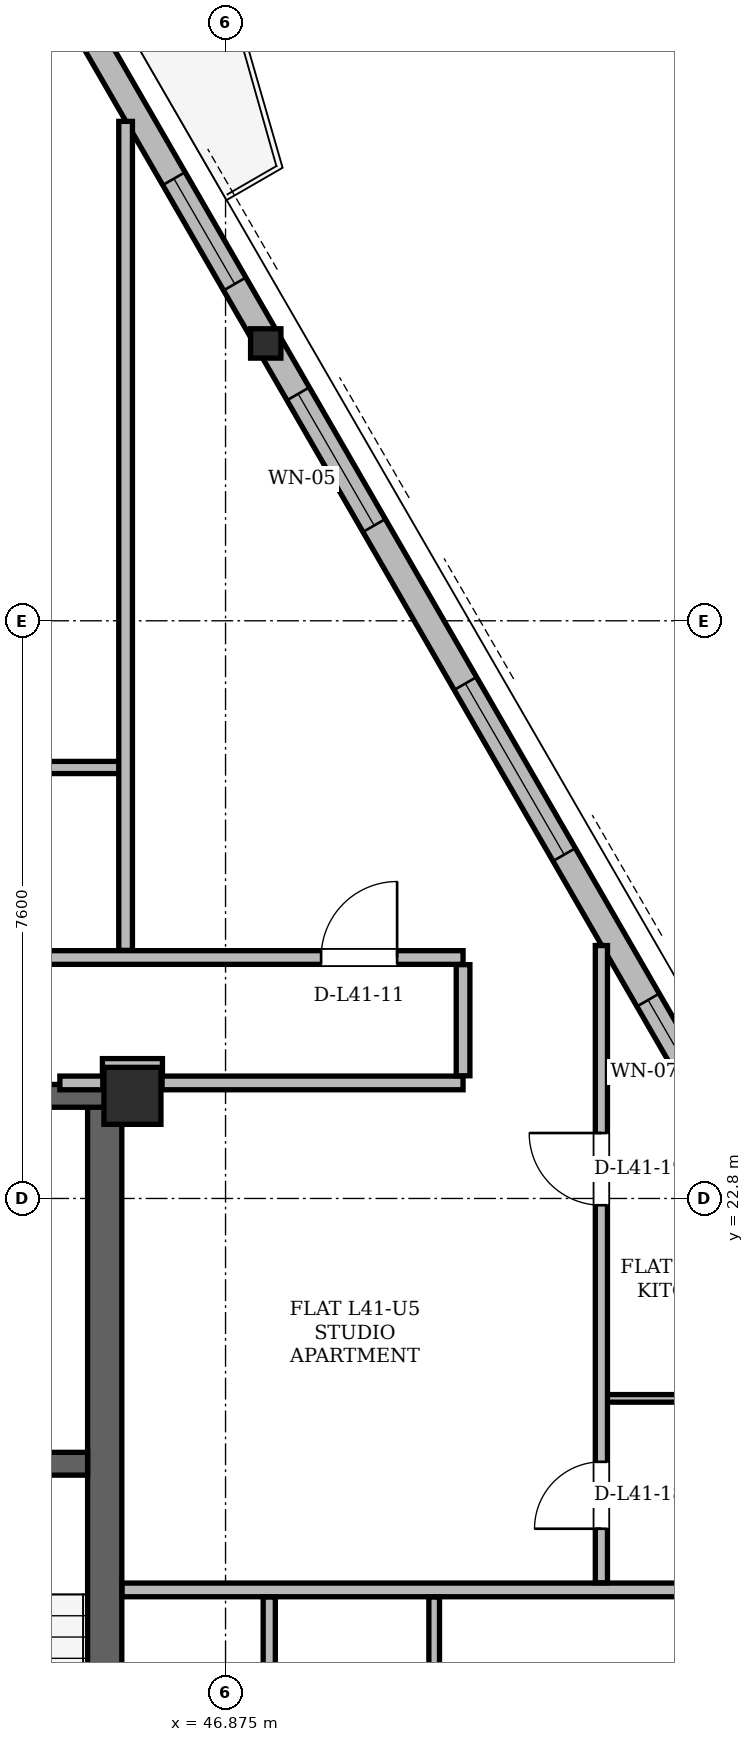
"""IFC4 building model, lengths in metres.
Left out: names, types, materials, properties, quantities, classifications, styles, units other than length and angle.
Written with IfcOpenShell. Run it as: python <this file> out.ifc"""

import sys

from ifc_helpers import new_model, si_unit, direction, frame, frame_2d, origin, origin_2d, place, context, subcontext, project, spatial, rectangle, hollow_rectangle, i_section, extrude, element, fill, save


model = new_model("IFC4")
c1 = context("Model", 3, precision=1e-05, world=origin(), true_north=direction((0.0, 1.0)))
c2 = subcontext(c1, "Body", "Model", "MODEL_VIEW")
j1 = project(units=[si_unit("LENGTHUNIT", "METRE"), si_unit("PLANEANGLEUNIT", "RADIAN")], contexts=[c1])
p1 = place(None, origin())
s1 = spatial("IfcSite", under=j1, at=p1, CompositionType="ELEMENT")
p2 = place(p1, origin())
s2 = spatial("IfcBuilding", under=s1, at=p2, CompositionType="ELEMENT")
p3 = place(p2, frame((0.0, 0.0, 156.6)))
s3 = spatial("IfcBuildingStorey", under=s2, at=p3, CompositionType="ELEMENT", Elevation=156.6)
p4 = place(p3, frame((45.65, 24.15, 0.0), z_axis=(0.0, 0.0, 1.0), x_axis=(1.0, 0.0, 0.0)))
e1 = element("IfcColumn", 1, at=p4, inside=s3, PredefinedType="COLUMN", context=c2, shape_type="SweptSolid", body=[
    extrude(hollow_rectangle(XDim=0.75, YDim=0.75, WallThickness=0.06, at=origin_2d()), origin(), (0.0, 0.0, 1.0), 3.6),
])
p5 = place(p3, frame((47.44, 34.062, 0.004), z_axis=(-0.020187050429, -0.007408715477, 0.999768770231), x_axis=(0.34453325986, -0.938774111728, 0.0)))
e2 = element("IfcColumn", 2, at=p5, inside=s3, PredefinedType="COLUMN", context=c2, shape_type="SweptSolid", body=[
    extrude(i_section(OverallWidth=0.399, OverallDepth=0.386, WebThickness=0.021, FlangeThickness=0.033, at=origin_2d()), origin(), (0.0, 0.0, 1.0), 3.592),
])
p6 = place(p3, frame((45.285, 11.0, 0.0), z_axis=(0.0, 0.0, 1.0), x_axis=(0.0, 1.0, 0.0)))
e3 = element("IfcWall", 3, at=p6, inside=s3, PredefinedType="SHEAR", context=c2, shape_type="SweptSolid", body=[
    extrude(rectangle(XDim=13.3, YDim=0.45, at=frame_2d((6.65, 0.0))), origin(), (0.0, 0.0, 1.0), 3.38),
])
p7 = place(p3, frame((29.65, 24.15, 0.0), z_axis=(0.0, 0.0, 1.0), x_axis=(1.0, 0.0, 0.0)))
e4 = element("IfcWall", 4, at=p7, inside=s3, PredefinedType="SHEAR", context=c2, shape_type="SweptSolid", body=[
    extrude(rectangle(XDim=15.7, YDim=0.3, at=frame_2d((7.85, 0.0))), origin(), (0.0, 0.0, 1.0), 3.38),
])
p8 = place(p7, frame((1.7, 0.0, 0.0)))
e5 = element("IfcOpeningElement", 5, at=p8, cuts=e4, PredefinedType="OPENING", context=c2, shape_type="SweptSolid", body=[
    extrude(rectangle(XDim=1.2, YDim=2.2, at=frame_2d((0.6, 1.1))), frame((0.0, 0.15, 0.0), z_axis=(0.0, -1.0, 0.0), x_axis=(1.0, 0.0, 0.0)), (0.0, 0.0, 1.0), 0.3),
])
p9 = place(p7, frame((12.8, 0.0, 0.0)))
e6 = element("IfcOpeningElement", 6, at=p9, cuts=e4, PredefinedType="OPENING", context=c2, shape_type="SweptSolid", body=[
    extrude(rectangle(XDim=1.2, YDim=2.2, at=frame_2d((0.6, 1.1))), frame((0.0, 0.15, 0.0), z_axis=(0.0, -1.0, 0.0), x_axis=(1.0, 0.0, 0.0)), (0.0, 0.0, 1.0), 0.3),
])
p10 = place(p7, frame((6.55, 0.0, 0.0)))
e7 = element("IfcOpeningElement", 7, at=p10, cuts=e4, PredefinedType="OPENING", context=c2, shape_type="SweptSolid", body=[
    extrude(rectangle(XDim=0.9, YDim=2.05, at=frame_2d((0.45, 1.025))), frame((0.0, 0.15, 0.0), z_axis=(0.0, -1.0, 0.0), x_axis=(1.0, 0.0, 0.0)), (0.0, 0.0, 1.0), 0.3),
])
p11 = place(p7, frame((8.45, 0.0, 0.0)))
e8 = element("IfcOpeningElement", 8, at=p11, cuts=e4, PredefinedType="OPENING", context=c2, shape_type="SweptSolid", body=[
    extrude(rectangle(XDim=0.9, YDim=2.05, at=frame_2d((0.45, 1.025))), frame((0.0, 0.15, 0.0), z_axis=(0.0, -1.0, 0.0), x_axis=(1.0, 0.0, 0.0)), (0.0, 0.0, 1.0), 0.3),
])
p12 = place(p3, frame((41.05, 19.31, 0.0), z_axis=(0.0, 0.0, 1.0), x_axis=(1.0, 0.0, 0.0)))
e9 = element("IfcWall", 9, at=p12, inside=s3, PredefinedType="SHEAR", context=c2, shape_type="SweptSolid", body=[
    extrude(rectangle(XDim=4.01, YDim=0.3, at=frame_2d((2.005, 0.0))), origin(), (0.0, 0.0, 1.0), 3.38),
])
p13 = place(p12, frame((1.6, 0.0, 0.0)))
e10 = element("IfcOpeningElement", 10, at=p13, cuts=e9, PredefinedType="OPENING", context=c2, shape_type="SweptSolid", body=[
    extrude(rectangle(XDim=1.4, YDim=2.2, at=frame_2d((0.7, 1.1))), frame((0.0, 0.15, 0.0), z_axis=(0.0, -1.0, 0.0), x_axis=(1.0, 0.0, 0.0)), (0.0, 0.0, 1.0), 0.3),
])
p14 = place(p3, frame((59.902, 12.477, 0.0), z_axis=(0.0, 0.0, 1.0), x_axis=(-0.499998839087, 0.866026074037, 0.0)))
e11 = element("IfcWall", 11, at=p14, inside=s3, PredefinedType="SOLIDWALL", context=c2, shape_type="SweptSolid", body=[
    extrude(rectangle(XDim=35.606, YDim=0.34, at=frame_2d((17.803, 0.0))), origin(), (0.0, 0.0, 1.0), 2.6),
])
p15 = place(p14, frame((7.615, 0.0, 0.0)))
e12 = element("IfcOpeningElement", 12, at=p15, cuts=e11, PredefinedType="OPENING", context=c2, shape_type="SweptSolid", body=[
    extrude(rectangle(XDim=1.5, YDim=2.2, at=frame_2d((0.75, 1.1))), frame((0.0, 0.17, 0.0), z_axis=(0.0, -1.0, 0.0), x_axis=(1.0, 0.0, 0.0)), (0.0, 0.0, 1.0), 0.34),
])
p16 = place(p14, frame((30.887, 0.0, 0.0)))
e13 = element("IfcOpeningElement", 13, at=p16, cuts=e11, PredefinedType="OPENING", context=c2, shape_type="SweptSolid", body=[
    extrude(rectangle(XDim=1.5, YDim=2.2, at=frame_2d((0.75, 1.1))), frame((0.0, 0.17, 0.0), z_axis=(0.0, -1.0, 0.0), x_axis=(1.0, 0.0, 0.0)), (0.0, 0.0, 1.0), 0.34),
])
p17 = place(p14, frame((0.903, 0.0, 0.85)))
e14 = element("IfcOpeningElement", 14, at=p17, cuts=e11, PredefinedType="OPENING", context=c2, shape_type="SweptSolid", body=[
    extrude(rectangle(XDim=1.2, YDim=1.48, at=frame_2d((0.6, 0.74))), frame((0.0, 0.17, 0.0), z_axis=(0.0, -1.0, 0.0), x_axis=(1.0, 0.0, 0.0)), (0.0, 0.0, 1.0), 0.34),
])
p18 = place(p14, frame((17.144, 0.0, 0.85)))
e15 = element("IfcOpeningElement", 15, at=p18, cuts=e11, PredefinedType="OPENING", context=c2, shape_type="SweptSolid", body=[
    extrude(rectangle(XDim=2.6, YDim=1.64, at=frame_2d((1.3, 0.82))), frame((0.0, 0.17, 0.0), z_axis=(0.0, -1.0, 0.0), x_axis=(1.0, 0.0, 0.0)), (0.0, 0.0, 1.0), 0.34),
])
p19 = place(p14, frame((22.144, 0.0, 0.85)))
e16 = element("IfcOpeningElement", 16, at=p19, cuts=e11, PredefinedType="OPENING", context=c2, shape_type="SweptSolid", body=[
    extrude(rectangle(XDim=2.0, YDim=1.64, at=frame_2d((1.0, 0.82))), frame((0.0, 0.17, 0.0), z_axis=(0.0, -1.0, 0.0), x_axis=(1.0, 0.0, 0.0)), (0.0, 0.0, 1.0), 0.34),
])
p20 = place(p14, frame((13.335, 0.0, 0.85)))
e17 = element("IfcOpeningElement", 17, at=p20, cuts=e11, PredefinedType="OPENING", context=c2, shape_type="SweptSolid", body=[
    extrude(rectangle(XDim=1.6, YDim=1.64, at=frame_2d((0.8, 0.82))), frame((0.0, 0.17, 0.0), z_axis=(0.0, -1.0, 0.0), x_axis=(1.0, 0.0, 0.0)), (0.0, 0.0, 1.0), 0.34),
])
p21 = place(p14, frame((25.813, 0.0, 0.85)))
e18 = element("IfcOpeningElement", 18, at=p21, cuts=e11, PredefinedType="OPENING", context=c2, shape_type="SweptSolid", body=[
    extrude(rectangle(XDim=1.6, YDim=1.64, at=frame_2d((0.8, 0.82))), frame((0.0, 0.17, 0.0), z_axis=(0.0, -1.0, 0.0), x_axis=(1.0, 0.0, 0.0)), (0.0, 0.0, 1.0), 0.34),
])
p22 = place(p14, frame((33.272, 0.0, 0.85)))
e19 = element("IfcOpeningElement", 19, at=p22, cuts=e11, PredefinedType="OPENING", context=c2, shape_type="SweptSolid", body=[
    extrude(rectangle(XDim=1.2, YDim=1.48, at=frame_2d((0.6, 0.74))), frame((0.0, 0.17, 0.0), z_axis=(0.0, -1.0, 0.0), x_axis=(1.0, 0.0, 0.0)), (0.0, 0.0, 1.0), 0.34),
])
p23 = place(p3, frame((45.514, 17.65, 0.0), z_axis=(0.0, 0.0, 1.0), x_axis=(1.0, 0.0, 0.0)))
e20 = element("IfcWall", 20, at=p23, inside=s3, PredefinedType="PARTITIONING", context=c2, shape_type="SweptSolid", body=[
    extrude(rectangle(XDim=11.201, YDim=0.18, at=frame_2d((5.6, 0.0))), origin(), (0.0, 0.0, 1.0), 2.42),
])
p24 = place(p3, frame((51.822, 20.17, 0.0), z_axis=(0.0, 0.0, 1.0), x_axis=(1.0, 0.0, 0.0)))
e21 = element("IfcWall", 21, at=p24, inside=s3, PredefinedType="PARTITIONING", context=c2, shape_type="SweptSolid", body=[
    extrude(rectangle(XDim=3.438, YDim=0.1, at=frame_2d((1.719, 0.0))), origin(), (0.0, 0.0, 1.0), 3.38),
])
p25 = place(p3, frame((44.695, 24.32, 0.0), z_axis=(0.0, 0.0, 1.0), x_axis=(1.0, 0.0, 0.0)))
e22 = element("IfcWall", 22, at=p25, inside=s3, PredefinedType="PARTITIONING", context=c2, shape_type="SweptSolid", body=[
    extrude(rectangle(XDim=0.565, YDim=0.18, at=frame_2d((0.282, 0.0))), origin(), (0.0, 0.0, 1.0), 2.42),
])
p26 = place(p3, frame((46.04, 24.32, 0.0), z_axis=(0.0, 0.0, 1.0), x_axis=(1.0, 0.0, 0.0)))
e23 = element("IfcWall", 23, at=p26, inside=s3, PredefinedType="PARTITIONING", context=c2, shape_type="SweptSolid", body=[
    extrude(rectangle(XDim=3.96, YDim=0.18, at=frame_2d((1.98, 0.0))), origin(), (0.0, 0.0, 1.0), 3.38),
])
p27 = place(p3, frame((45.255, 24.55, 0.0), z_axis=(0.0, 0.0, 1.0), x_axis=(1.0, 0.0, 0.0)))
e24 = element("IfcWall", 24, at=p27, inside=s3, PredefinedType="PARTITIONING", context=c2, shape_type="SweptSolid", body=[
    extrude(rectangle(XDim=0.79, YDim=0.18, at=frame_2d((0.395, 0.0))), origin(), (0.0, 0.0, 1.0), 2.842),
])
p28 = place(p3, frame((38.3, 25.97, 0.0), z_axis=(0.0, 0.0, 1.0), x_axis=(1.0, 0.0, 0.0)))
e25 = element("IfcWall", 25, at=p28, inside=s3, PredefinedType="PARTITIONING", context=c2, shape_type="SweptSolid", body=[
    extrude(rectangle(XDim=11.7, YDim=0.18, at=frame_2d((5.85, 0.0))), origin(), (0.0, 0.0, 1.0), 2.842),
])
p29 = place(p28, frame((9.832, 0.0, 0.0)))
e26 = element("IfcOpeningElement", 26, at=p29, cuts=e25, PredefinedType="OPENING", context=c2, shape_type="SweptSolid", body=[
    extrude(rectangle(XDim=1.0, YDim=2.18, at=frame_2d((0.5, 1.09))), frame((0.0, 0.09, 0.0), z_axis=(0.0, -1.0, 0.0), x_axis=(1.0, 0.0, 0.0)), (0.0, 0.0, 1.0), 0.18),
])
p30 = place(p3, frame((38.218, 28.47, 0.0), z_axis=(0.0, 0.0, 1.0), x_axis=(1.0, 0.0, 0.0)))
e27 = element("IfcWall", 27, at=p30, inside=s3, PredefinedType="PARTITIONING", context=c2, shape_type="SweptSolid", body=[
    extrude(rectangle(XDim=7.424, YDim=0.16, at=frame_2d((3.712, 0.0))), origin(), (0.0, 0.0, 1.0), 2.842),
])
p31 = place(p30, frame((3.272, 0.0, 0.0)))
e28 = element("IfcOpeningElement", 28, at=p31, cuts=e27, PredefinedType="OPENING", context=c2, shape_type="SweptSolid", body=[
    extrude(rectangle(XDim=0.88, YDim=2.08, at=frame_2d((0.44, 1.04))), frame((0.0, 0.08, 0.0), z_axis=(0.0, -1.0, 0.0), x_axis=(1.0, 0.0, 0.0)), (0.0, 0.0, 1.0), 0.16),
])
p32 = place(p3, frame((45.56, 26.064, 0.0), z_axis=(0.0, 0.0, 1.0), x_axis=(0.0, 1.0, 0.0)))
e29 = element("IfcWall", 29, at=p32, inside=s3, PredefinedType="PARTITIONING", context=c2, shape_type="SweptSolid", body=[
    extrude(rectangle(XDim=10.906, YDim=0.18, at=frame_2d((5.453, 0.0))), origin(), (0.0, 0.0, 1.0), 3.38),
])
p33 = place(p3, frame((47.45, 13.024, 0.0), z_axis=(0.0, 0.0, 1.0), x_axis=(0.0, 1.0, 0.0)))
e30 = element("IfcWall", 30, at=p33, inside=s3, PredefinedType="PARTITIONING", context=c2, shape_type="SweptSolid", body=[
    extrude(rectangle(XDim=4.532, YDim=0.16, at=frame_2d((2.266, 0.0))), origin(), (0.0, 0.0, 1.0), 3.38),
])
p34 = place(p3, frame((49.62, 13.024, 0.0), z_axis=(0.0, 0.0, 1.0), x_axis=(0.0, 1.0, 0.0)))
e31 = element("IfcWall", 31, at=p34, inside=s3, PredefinedType="PARTITIONING", context=c2, shape_type="SweptSolid", body=[
    extrude(rectangle(XDim=4.532, YDim=0.14, at=frame_2d((2.266, 0.0))), origin(), (0.0, 0.0, 1.0), 3.38),
])
p35 = place(p3, frame((50.0, 24.414, 0.0), z_axis=(0.0, 0.0, 1.0), x_axis=(0.0, 1.0, 0.0)))
e32 = element("IfcWall", 32, at=p35, inside=s3, PredefinedType="PARTITIONING", context=c2, shape_type="SweptSolid", body=[
    extrude(rectangle(XDim=1.462, YDim=0.18, at=frame_2d((0.731, 0.0))), origin(), (0.0, 0.0, 1.0), 3.38),
])
p36 = place(p3, frame((51.82, 17.744, 0.0), z_axis=(0.0, 0.0, 1.0), x_axis=(0.0, 1.0, 0.0)))
e33 = element("IfcWall", 33, at=p36, inside=s3, PredefinedType="PARTITIONING", context=c2, shape_type="SweptSolid", body=[
    extrude(rectangle(XDim=8.384, YDim=0.16, at=frame_2d((4.192, 0.0))), origin(), (0.0, 0.0, 1.0), 3.38),
])
p37 = place(p36, frame((0.711, 0.0, 0.0)))
e34 = element("IfcOpeningElement", 34, at=p37, cuts=e33, PredefinedType="OPENING", context=c2, shape_type="SweptSolid", body=[
    extrude(rectangle(XDim=0.88, YDim=2.08, at=frame_2d((0.44, 1.04))), frame((0.0, 0.08, 0.0), z_axis=(0.0, -1.0, 0.0), x_axis=(1.0, 0.0, 0.0)), (0.0, 0.0, 1.0), 0.16),
])
p38 = place(p36, frame((4.967, 0.0, 0.0)))
e35 = element("IfcOpeningElement", 35, at=p38, cuts=e33, PredefinedType="OPENING", context=c2, shape_type="SweptSolid", body=[
    extrude(rectangle(XDim=0.95, YDim=2.1, at=frame_2d((0.475, 1.05))), frame((0.0, 0.08, 0.0), z_axis=(0.0, -1.0, 0.0), x_axis=(1.0, 0.0, 0.0)), (0.0, 0.0, 1.0), 0.16),
])
p39 = place(p18, origin())
e36 = element("IfcWindow", 36, at=p39, inside=s3, PartitioningType="SINGLE_PANEL", PredefinedType="WINDOW", context=c2, shape_type="SweptSolid", body=[
    extrude(rectangle(XDim=2.6, YDim=1.64, at=frame_2d((1.3, 0.82))), frame((0.0, 0.03, 0.0), z_axis=(0.0, -1.0, 0.0), x_axis=(1.0, 0.0, 0.0)), (0.0, 0.0, 1.0), 0.06),
])
fill(e15, e36)
p40 = place(p19, origin())
e37 = element("IfcWindow", 37, at=p40, inside=s3, PartitioningType="SINGLE_PANEL", PredefinedType="WINDOW", context=c2, shape_type="SweptSolid", body=[
    extrude(rectangle(XDim=2.0, YDim=1.64, at=frame_2d((1.0, 0.82))), frame((0.0, 0.03, 0.0), z_axis=(0.0, -1.0, 0.0), x_axis=(1.0, 0.0, 0.0)), (0.0, 0.0, 1.0), 0.06),
])
fill(e16, e37)
p41 = place(p20, origin())
e38 = element("IfcWindow", 38, at=p41, inside=s3, PartitioningType="SINGLE_PANEL", PredefinedType="WINDOW", context=c2, shape_type="SweptSolid", body=[
    extrude(rectangle(XDim=1.6, YDim=1.64, at=frame_2d((0.8, 0.82))), frame((0.0, 0.03, 0.0), z_axis=(0.0, -1.0, 0.0), x_axis=(1.0, 0.0, 0.0)), (0.0, 0.0, 1.0), 0.06),
])
fill(e17, e38)
p42 = place(p21, origin())
e39 = element("IfcWindow", 39, at=p42, inside=s3, PartitioningType="SINGLE_PANEL", PredefinedType="WINDOW", context=c2, shape_type="SweptSolid", body=[
    extrude(rectangle(XDim=1.6, YDim=1.64, at=frame_2d((0.8, 0.82))), frame((0.0, 0.03, 0.0), z_axis=(0.0, -1.0, 0.0), x_axis=(1.0, 0.0, 0.0)), (0.0, 0.0, 1.0), 0.06),
])
fill(e18, e39)
p43 = place(p29, origin())
e40 = element("IfcDoor", 40, at=p43, inside=s3, OperationType="SINGLE_SWING_RIGHT", PredefinedType="DOOR", context=c2, shape_type="SweptSolid", body=[
    extrude(rectangle(XDim=1.0, YDim=2.18, at=frame_2d((0.5, 1.09))), frame((0.0, 0.025, 0.0), z_axis=(0.0, -1.0, 0.0), x_axis=(1.0, 0.0, 0.0)), (0.0, 0.0, 1.0), 0.05),
])
fill(e26, e40)
p44 = place(p37, origin())
e41 = element("IfcDoor", 41, at=p44, inside=s3, OperationType="SINGLE_SWING_LEFT", PredefinedType="DOOR", context=c2, shape_type="SweptSolid", body=[
    extrude(rectangle(XDim=0.88, YDim=2.08, at=frame_2d((0.44, 1.04))), frame((0.0, 0.025, 0.0), z_axis=(0.0, -1.0, 0.0), x_axis=(1.0, 0.0, 0.0)), (0.0, 0.0, 1.0), 0.05),
])
fill(e34, e41)
p45 = place(p38, origin())
e42 = element("IfcDoor", 42, at=p45, inside=s3, OperationType="SINGLE_SWING_RIGHT", PredefinedType="DOOR", context=c2, shape_type="SweptSolid", body=[
    extrude(rectangle(XDim=0.95, YDim=2.1, at=frame_2d((0.475, 1.05))), frame((0.0, 0.025, 0.0), z_axis=(0.0, -1.0, 0.0), x_axis=(1.0, 0.0, 0.0)), (0.0, 0.0, 1.0), 0.05),
])
fill(e35, e42)
save(model, sys.argv[1])
